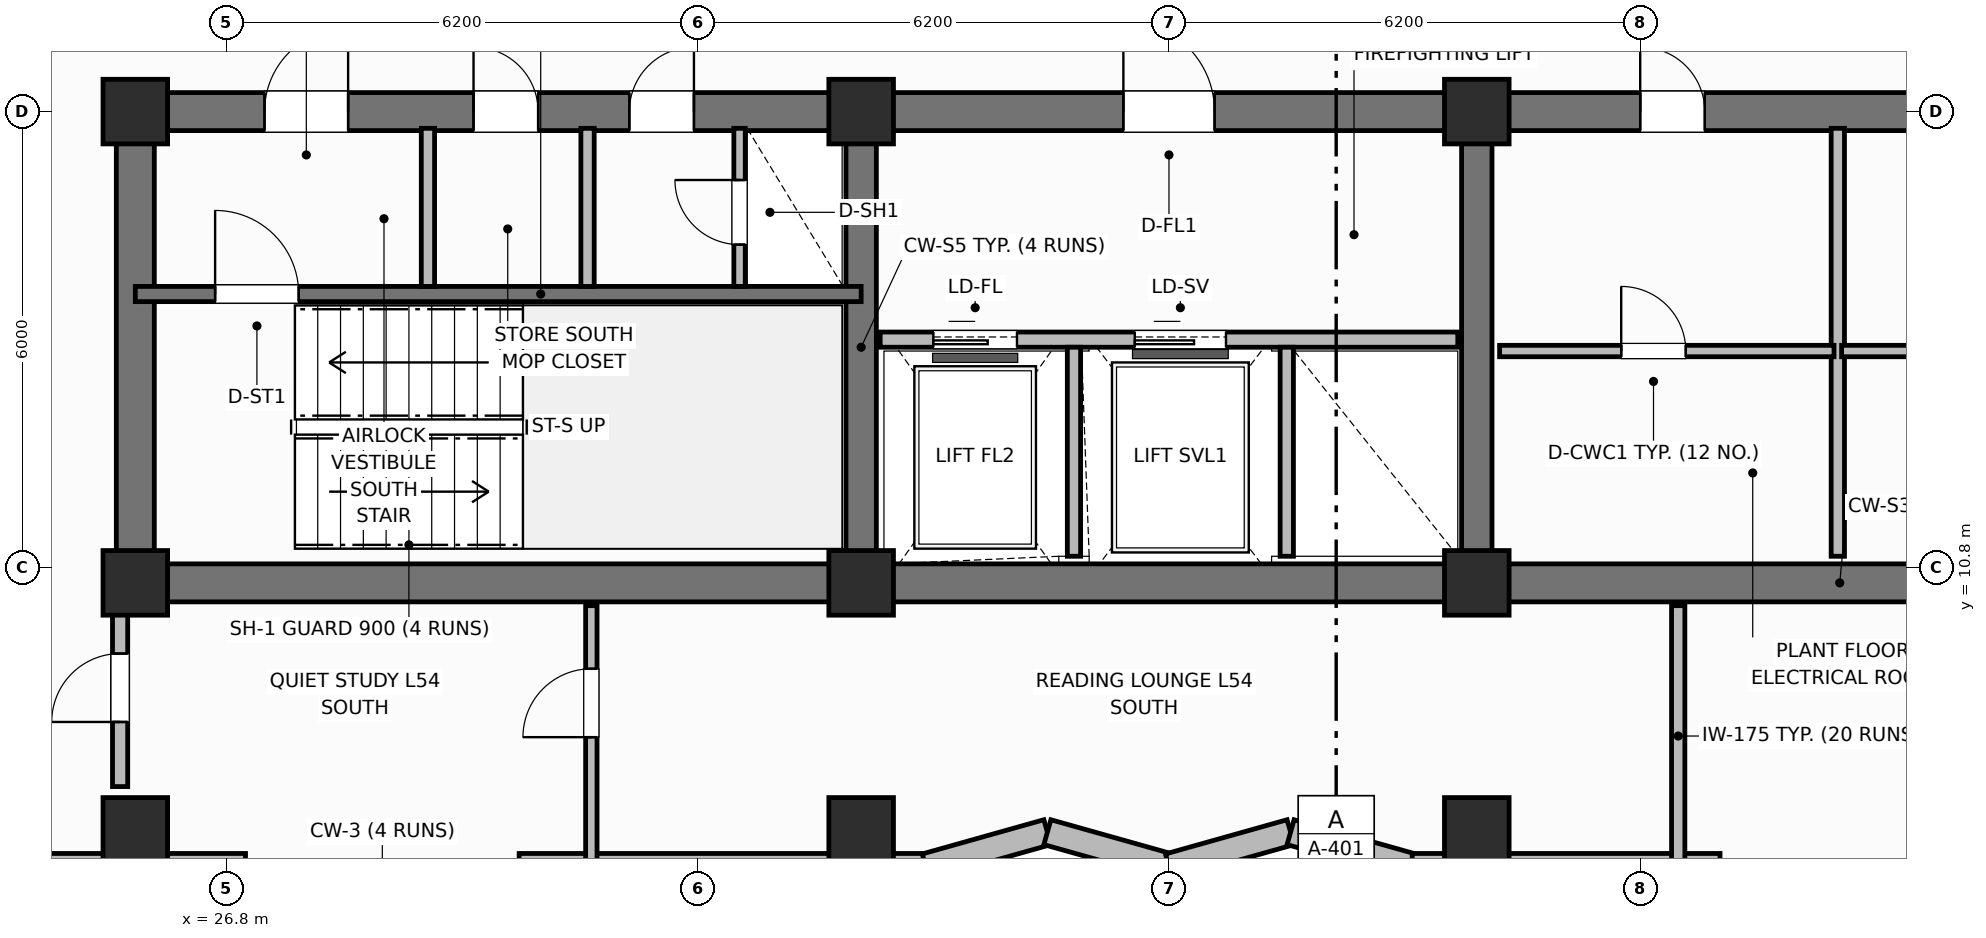
"""IFC4 building model, lengths in metres.
Left out: names, types, materials, properties, quantities, classifications, styles, units other than length and angle.
Written with IfcOpenShell. Run it as: python <this file> out.ifc"""

import sys

from ifc_helpers import new_model, si_unit, direction, frame, frame_2d, origin, origin_2d, place, context, subcontext, project, spatial, rectangle, extrude, element, fill, save


model = new_model("IFC4")
c1 = context("Model", 3, precision=1e-05, world=origin(), true_north=direction((0.0, 1.0)))
c2 = subcontext(c1, "Body", "Model", "MODEL_VIEW")
j1 = project(units=[si_unit("LENGTHUNIT", "METRE"), si_unit("PLANEANGLEUNIT", "RADIAN")], contexts=[c1])
p1 = place(None, origin())
s1 = spatial("IfcSite", under=j1, at=p1, CompositionType="ELEMENT")
p2 = place(p1, origin())
s2 = spatial("IfcBuilding", under=s1, at=p2, CompositionType="ELEMENT")
p3 = place(p2, frame((0.0, 0.0, 218.4)))
s3 = spatial("IfcBuildingStorey", under=s2, at=p3, CompositionType="ELEMENT", Elevation=218.4)
p4 = place(p3, frame((52.8, 10.6, 0.0), z_axis=(0.0, 0.0, 1.0), x_axis=(-1.0, 0.0, 0.0)))
e1 = element("IfcWall", 1, at=p4, inside=s3, PredefinedType="SHEAR", context=c2, shape_type="SweptSolid", body=[
    extrude(rectangle(XDim=27.2, YDim=0.5, at=frame_2d((13.6, 0.0))), origin(), (0.0, 0.0, 1.0), 3.7),
])
p5 = place(p3, frame((25.6, 10.85, 0.0), z_axis=(0.0, 0.0, 1.0), x_axis=(0.0, 1.0, 0.0)))
e2 = element("IfcWall", 2, at=p5, inside=s3, PredefinedType="SHEAR", context=c2, shape_type="SweptSolid", body=[
    extrude(rectangle(XDim=5.7, YDim=0.5, at=frame_2d((2.85, 0.0))), origin(), (0.0, 0.0, 1.0), 3.7),
])
p6 = place(p3, frame((25.6, 16.8, 0.0), z_axis=(0.0, 0.0, 1.0), x_axis=(1.0, 0.0, 0.0)))
e3 = element("IfcWall", 3, at=p6, inside=s3, PredefinedType="SHEAR", context=c2, shape_type="SweptSolid", body=[
    extrude(rectangle(XDim=27.2, YDim=0.5, at=frame_2d((13.6, 0.0))), origin(), (0.0, 0.0, 1.0), 3.7),
])
p7 = place(p6, frame((1.7, 0.0, 0.0)))
e4 = element("IfcOpeningElement", 4, at=p7, cuts=e3, PredefinedType="OPENING", context=c2, shape_type="SweptSolid", body=[
    extrude(rectangle(XDim=1.1, YDim=2.15, at=frame_2d((0.55, 1.075))), frame((0.0, 0.26, 0.0), z_axis=(0.0, -1.0, 0.0), x_axis=(1.0, 0.0, 0.0)), (0.0, 0.0, 1.0), 0.52),
])
p8 = place(p6, frame((4.45, 0.0, 0.0)))
e5 = element("IfcOpeningElement", 5, at=p8, cuts=e3, PredefinedType="OPENING", context=c2, shape_type="SweptSolid", body=[
    extrude(rectangle(XDim=0.85, YDim=2.1, at=frame_2d((0.425, 1.05))), frame((0.0, 0.26, 0.0), z_axis=(0.0, -1.0, 0.0), x_axis=(1.0, 0.0, 0.0)), (0.0, 0.0, 1.0), 0.52),
])
p9 = place(p6, frame((6.5, 0.0, 0.0)))
e6 = element("IfcOpeningElement", 6, at=p9, cuts=e3, PredefinedType="OPENING", context=c2, shape_type="SweptSolid", body=[
    extrude(rectangle(XDim=0.85, YDim=2.1, at=frame_2d((0.425, 1.05))), frame((0.0, 0.26, 0.0), z_axis=(0.0, -1.0, 0.0), x_axis=(1.0, 0.0, 0.0)), (0.0, 0.0, 1.0), 0.52),
])
p10 = place(p6, frame((13.0, 0.0, 0.0)))
e7 = element("IfcOpeningElement", 7, at=p10, cuts=e3, PredefinedType="OPENING", context=c2, shape_type="SweptSolid", body=[
    extrude(rectangle(XDim=1.2, YDim=2.15, at=frame_2d((0.6, 1.075))), frame((0.0, 0.26, 0.0), z_axis=(0.0, -1.0, 0.0), x_axis=(1.0, 0.0, 0.0)), (0.0, 0.0, 1.0), 0.52),
])
p11 = place(p6, frame((19.8, 0.0, 0.0)))
e8 = element("IfcOpeningElement", 8, at=p11, cuts=e3, PredefinedType="OPENING", context=c2, shape_type="SweptSolid", body=[
    extrude(rectangle(XDim=0.85, YDim=2.1, at=frame_2d((0.425, 1.05))), frame((0.0, 0.26, 0.0), z_axis=(0.0, -1.0, 0.0), x_axis=(1.0, 0.0, 0.0)), (0.0, 0.0, 1.0), 0.52),
])
p12 = place(p6, frame((24.2, 0.0, 0.0)))
e9 = element("IfcOpeningElement", 9, at=p12, cuts=e3, PredefinedType="OPENING", context=c2, shape_type="SweptSolid", body=[
    extrude(rectangle(XDim=0.85, YDim=2.1, at=frame_2d((0.425, 1.05))), frame((0.0, 0.26, 0.0), z_axis=(0.0, -1.0, 0.0), x_axis=(1.0, 0.0, 0.0)), (0.0, 0.0, 1.0), 0.52),
])
for number, where, z_axis, x_axis in (
    (10, (35.15, 10.85, 0.0), (0.0, 0.0, 1.0), (0.0, 1.0, 0.0)),
    (11, (43.25, 10.85, 0.0), (0.0, 0.0, 1.0), (0.0, 1.0, 0.0)),
):
    element("IfcWall", number, at=place(p3, frame(where, z_axis=z_axis, x_axis=x_axis)), inside=s3, PredefinedType="SHEAR", context=c2, shape_type="SweptSolid", body=[
        extrude(rectangle(XDim=5.7, YDim=0.4, at=frame_2d((2.85, 0.0))), origin(), (0.0, 0.0, 1.0), 3.7),
    ])
for number, where, z_axis, x_axis in (
    (12, (25.6, 10.6, 0.0), (0.0, 0.0, 1.0), (1.0, 0.0, 0.0)),
    (13, (25.6, 16.8, 0.0), (0.0, 0.0, 1.0), (1.0, 0.0, 0.0)),
    (14, (35.15, 10.6, 0.0), (0.0, 0.0, 1.0), (1.0, 0.0, 0.0)),
    (15, (35.15, 16.8, 0.0), (0.0, 0.0, 1.0), (1.0, 0.0, 0.0)),
    (16, (43.25, 10.6, 0.0), (0.0, 0.0, 1.0), (1.0, 0.0, 0.0)),
    (17, (43.25, 16.8, 0.0), (0.0, 0.0, 1.0), (1.0, 0.0, 0.0)),
    (18, (25.6, 7.35, 0.0), (0.0, 0.0, 1.0), (1.0, 0.0, 0.0)),
    (19, (35.15, 7.35, 0.0), (0.0, 0.0, 1.0), (1.0, 0.0, 0.0)),
    (20, (43.25, 7.35, 0.0), (0.0, 0.0, 1.0), (1.0, 0.0, 0.0)),
):
    element("IfcColumn", number, at=place(p3, frame(where, z_axis=z_axis, x_axis=x_axis)), inside=s3, PredefinedType="COLUMN", context=c2, shape_type="SweptSolid", body=[
        extrude(rectangle(XDim=0.85, YDim=0.85, at=origin_2d()), origin(), (0.0, 0.0, 1.0), 3.7),
    ])
p13 = place(p3, frame((20.2, 6.87, 0.0), z_axis=(0.0, 0.0, 1.0), x_axis=(1.0, 0.0, 0.0)))
e21 = element("IfcWall", 21, at=p13, inside=s3, PredefinedType="SOLIDWALL", context=c2, shape_type="SweptSolid", body=[
    extrude(rectangle(XDim=6.85, YDim=0.34, at=frame_2d((3.425, 0.0))), origin(), (0.0, 0.0, 1.0), 2.72),
])
p14 = place(p3, frame((30.65, 6.87, 0.0), z_axis=(0.0, 0.0, 1.0), x_axis=(1.0, 0.0, 0.0)))
e22 = element("IfcWall", 22, at=p14, inside=s3, PredefinedType="SOLIDWALL", context=c2, shape_type="SweptSolid", body=[
    extrude(rectangle(XDim=5.35, YDim=0.34, at=frame_2d((2.675, 0.0))), origin(), (0.0, 0.0, 1.0), 2.72),
])
p15 = place(p3, frame((36.0, 6.87, 0.0), z_axis=(0.0, 0.0, 1.0), x_axis=(0.962662902433, 0.270703040766, 0.0)))
e23 = element("IfcWall", 23, at=p15, inside=s3, PredefinedType="SOLIDWALL", context=c2, shape_type="SweptSolid", body=[
    extrude(rectangle(XDim=1.662, YDim=0.34, at=frame_2d((0.831, 0.0))), origin(), (0.0, 0.0, 1.0), 2.72),
])
p16 = place(p3, frame((37.6, 7.32, 0.0), z_axis=(0.0, 0.0, 1.0), x_axis=(0.962652136636, -0.270741322725, 0.0)))
e24 = element("IfcWall", 24, at=p16, inside=s3, PredefinedType="SOLIDWALL", context=c2, shape_type="SweptSolid", body=[
    extrude(rectangle(XDim=1.662, YDim=0.34, at=frame_2d((0.831, 0.0))), origin(), (0.0, 0.0, 1.0), 2.72),
])
p17 = place(p3, frame((39.2, 6.87, 0.0), z_axis=(0.0, 0.0, 1.0), x_axis=(0.962662902433, 0.270703040766, 0.0)))
e25 = element("IfcWall", 25, at=p17, inside=s3, PredefinedType="SOLIDWALL", context=c2, shape_type="SweptSolid", body=[
    extrude(rectangle(XDim=1.662, YDim=0.34, at=frame_2d((0.831, 0.0))), origin(), (0.0, 0.0, 1.0), 2.72),
])
p18 = place(p3, frame((40.8, 7.32, 0.0), z_axis=(0.0, 0.0, 1.0), x_axis=(0.962652136636, -0.270741322725, 0.0)))
e26 = element("IfcWall", 26, at=p18, inside=s3, PredefinedType="SOLIDWALL", context=c2, shape_type="SweptSolid", body=[
    extrude(rectangle(XDim=1.662, YDim=0.34, at=frame_2d((0.831, 0.0))), origin(), (0.0, 0.0, 1.0), 2.72),
])
p19 = place(p3, frame((42.4, 6.87, 0.0), z_axis=(0.0, 0.0, 1.0), x_axis=(1.0, 0.0, 0.0)))
e27 = element("IfcWall", 27, at=p19, inside=s3, PredefinedType="SOLIDWALL", context=c2, shape_type="SweptSolid", body=[
    extrude(rectangle(XDim=4.05, YDim=0.34, at=frame_2d((2.025, 0.0))), origin(), (0.0, 0.0, 1.0), 2.72),
])
p20 = place(p3, frame((25.6, 14.4, 0.0), z_axis=(0.0, 0.0, 1.0), x_axis=(1.0, 0.0, 0.0)))
e28 = element("IfcWall", 28, at=p20, inside=s3, PredefinedType="SHEAR", context=c2, shape_type="SweptSolid", body=[
    extrude(rectangle(XDim=9.55, YDim=0.2, at=frame_2d((4.775, 0.0))), origin(), (0.0, 0.0, 1.0), 3.7),
])
p21 = place(p20, frame((1.05, 0.0, 0.0)))
e29 = element("IfcOpeningElement", 29, at=p21, cuts=e28, PredefinedType="OPENING", context=c2, shape_type="SweptSolid", body=[
    extrude(rectangle(XDim=1.1, YDim=2.15, at=frame_2d((0.55, 1.075))), frame((0.0, 0.11, 0.0), z_axis=(0.0, -1.0, 0.0), x_axis=(1.0, 0.0, 0.0)), (0.0, 0.0, 1.0), 0.22),
])
for number, where, z_axis, x_axis in (
    (30, (29.45, 14.5, 0.0), (0.0, 0.0, 1.0), (0.0, 1.0, 0.0)),
    (31, (31.55, 14.5, 0.0), (0.0, 0.0, 1.0), (0.0, 1.0, 0.0)),
):
    element("IfcWall", number, at=place(p3, frame(where, z_axis=z_axis, x_axis=x_axis)), inside=s3, PredefinedType="PARTITIONING", context=c2, shape_type="SweptSolid", body=[
        extrude(rectangle(XDim=2.08, YDim=0.175, at=frame_2d((1.04, 0.0))), origin(), (0.0, 0.0, 1.0), 2.55),
    ])
p22 = place(p3, frame((33.55, 14.5, 0.0), z_axis=(0.0, 0.0, 1.0), x_axis=(0.0, 1.0, 0.0)))
e32 = element("IfcWall", 32, at=p22, inside=s3, PredefinedType="PARTITIONING", context=c2, shape_type="SweptSolid", body=[
    extrude(rectangle(XDim=2.08, YDim=0.15, at=frame_2d((1.04, 0.0))), origin(), (0.0, 0.0, 1.0), 2.55),
])
p23 = place(p22, frame((0.55, 0.0, 0.0)))
e33 = element("IfcOpeningElement", 33, at=p23, cuts=e32, PredefinedType="OPENING", context=c2, shape_type="SweptSolid", body=[
    extrude(rectangle(XDim=0.85, YDim=2.05, at=frame_2d((0.425, 1.025))), frame((0.0, 0.085, 0.0), z_axis=(0.0, -1.0, 0.0), x_axis=(1.0, 0.0, 0.0)), (0.0, 0.0, 1.0), 0.17),
])
p24 = place(p3, frame((35.4, 13.8, 0.0), z_axis=(0.0, 0.0, 1.0), x_axis=(1.0, 0.0, 0.0)))
e34 = element("IfcWall", 34, at=p24, inside=s3, PredefinedType="PARTITIONING", context=c2, shape_type="SweptSolid", body=[
    extrude(rectangle(XDim=7.6, YDim=0.2, at=frame_2d((3.8, 0.0))), origin(), (0.0, 0.0, 1.0), 2.32),
])
p25 = place(p24, frame((0.7, 0.0, 0.0)))
e35 = element("IfcOpeningElement", 35, at=p25, cuts=e34, PredefinedType="OPENING", context=c2, shape_type="SweptSolid", body=[
    extrude(rectangle(XDim=1.1, YDim=2.15, at=frame_2d((0.55, 1.075))), frame((0.0, 0.11, 0.0), z_axis=(0.0, -1.0, 0.0), x_axis=(1.0, 0.0, 0.0)), (0.0, 0.0, 1.0), 0.22),
])
p26 = place(p24, frame((3.35, 0.0, 0.0)))
e36 = element("IfcOpeningElement", 36, at=p26, cuts=e34, PredefinedType="OPENING", context=c2, shape_type="SweptSolid", body=[
    extrude(rectangle(XDim=1.2, YDim=2.15, at=frame_2d((0.6, 1.075))), frame((0.0, 0.11, 0.0), z_axis=(0.0, -1.0, 0.0), x_axis=(1.0, 0.0, 0.0)), (0.0, 0.0, 1.0), 0.22),
])
for number, where, z_axis, x_axis in (
    (37, (37.95, 10.95, 0.0), (0.0, 0.0, 1.0), (0.0, 1.0, 0.0)),
    (38, (40.75, 10.95, 0.0), (0.0, 0.0, 1.0), (0.0, 1.0, 0.0)),
):
    element("IfcWall", number, at=place(p3, frame(where, z_axis=z_axis, x_axis=x_axis)), inside=s3, PredefinedType="PARTITIONING", context=c2, shape_type="SweptSolid", body=[
        extrude(rectangle(XDim=2.75, YDim=0.175, at=frame_2d((1.375, 0.0))), origin(), (0.0, 0.0, 1.0), 2.55),
    ])
p27 = place(p3, frame((48.0, 10.95, 0.0), z_axis=(0.0, 0.0, 1.0), x_axis=(0.0, 1.0, 0.0)))
e39 = element("IfcWall", 39, at=p27, inside=s3, PredefinedType="PARTITIONING", context=c2, shape_type="SweptSolid", body=[
    extrude(rectangle(XDim=5.63, YDim=0.175, at=frame_2d((2.815, 0.0))), origin(), (0.0, 0.0, 1.0), 2.55),
])
p28 = place(p3, frame((43.55, 13.65, 0.0), z_axis=(0.0, 0.0, 1.0), x_axis=(1.0, 0.0, 0.0)))
e40 = element("IfcWall", 40, at=p28, inside=s3, PredefinedType="PARTITIONING", context=c2, shape_type="SweptSolid", body=[
    extrude(rectangle(XDim=4.4, YDim=0.15, at=frame_2d((2.2, 0.0))), origin(), (0.0, 0.0, 1.0), 2.55),
])
p29 = place(p28, frame((1.6, 0.0, 0.0)))
e41 = element("IfcOpeningElement", 41, at=p29, cuts=e40, PredefinedType="OPENING", context=c2, shape_type="SweptSolid", body=[
    extrude(rectangle(XDim=0.85, YDim=2.1, at=frame_2d((0.425, 1.05))), frame((0.0, 0.085, 0.0), z_axis=(0.0, -1.0, 0.0), x_axis=(1.0, 0.0, 0.0)), (0.0, 0.0, 1.0), 0.17),
])
p30 = place(p3, frame((48.05, 13.65, 0.0), z_axis=(0.0, 0.0, 1.0), x_axis=(1.0, 0.0, 0.0)))
e42 = element("IfcWall", 42, at=p30, inside=s3, PredefinedType="PARTITIONING", context=c2, shape_type="SweptSolid", body=[
    extrude(rectangle(XDim=4.4, YDim=0.15, at=frame_2d((2.2, 0.0))), origin(), (0.0, 0.0, 1.0), 2.55),
])
p31 = place(p30, frame((1.6, 0.0, 0.0)))
e43 = element("IfcOpeningElement", 43, at=p31, cuts=e42, PredefinedType="OPENING", context=c2, shape_type="SweptSolid", body=[
    extrude(rectangle(XDim=0.85, YDim=2.1, at=frame_2d((0.425, 1.05))), frame((0.0, 0.085, 0.0), z_axis=(0.0, -1.0, 0.0), x_axis=(1.0, 0.0, 0.0)), (0.0, 0.0, 1.0), 0.17),
])
p32 = place(p3, frame((31.6, 6.87, 0.0), z_axis=(0.0, 0.0, 1.0), x_axis=(0.0, 1.0, 0.0)))
e44 = element("IfcWall", 44, at=p32, inside=s3, PredefinedType="PARTITIONING", context=c2, shape_type="SweptSolid", body=[
    extrude(rectangle(XDim=3.43, YDim=0.15, at=frame_2d((1.715, 0.0))), origin(), (0.0, 0.0, 1.0), 2.55),
])
p33 = place(p32, frame((1.7, 0.0, 0.0)))
e45 = element("IfcOpeningElement", 45, at=p33, cuts=e44, PredefinedType="OPENING", context=c2, shape_type="SweptSolid", body=[
    extrude(rectangle(XDim=0.9, YDim=2.1, at=frame_2d((0.45, 1.05))), frame((0.0, 0.085, 0.0), z_axis=(0.0, -1.0, 0.0), x_axis=(1.0, 0.0, 0.0)), (0.0, 0.0, 1.0), 0.17),
])
p34 = place(p3, frame((45.9, 6.87, 0.0), z_axis=(0.0, 0.0, 1.0), x_axis=(0.0, 1.0, 0.0)))
e46 = element("IfcWall", 46, at=p34, inside=s3, PredefinedType="PARTITIONING", context=c2, shape_type="SweptSolid", body=[
    extrude(rectangle(XDim=3.43, YDim=0.175, at=frame_2d((1.715, 0.0))), origin(), (0.0, 0.0, 1.0), 2.55),
])
p35 = place(p3, frame((25.4, 7.92, 0.0), z_axis=(0.0, 0.0, 1.0), x_axis=(0.0, 1.0, 0.0)))
e47 = element("IfcWall", 47, at=p35, inside=s3, PredefinedType="PARTITIONING", context=c2, shape_type="SweptSolid", body=[
    extrude(rectangle(XDim=2.38, YDim=0.2, at=frame_2d((1.19, 0.0))), origin(), (0.0, 0.0, 1.0), 2.55),
])
p36 = place(p35, frame((0.85, 0.0, 0.0)))
e48 = element("IfcOpeningElement", 48, at=p36, cuts=e47, PredefinedType="OPENING", context=c2, shape_type="SweptSolid", body=[
    extrude(rectangle(XDim=0.9, YDim=2.1, at=frame_2d((0.45, 1.05))), frame((0.0, 0.11, 0.0), z_axis=(0.0, -1.0, 0.0), x_axis=(1.0, 0.0, 0.0)), (0.0, 0.0, 1.0), 0.22),
])
p37 = place(p21, origin())
e49 = element("IfcDoor", 49, at=p37, inside=s3, OperationType="SINGLE_SWING_LEFT", PredefinedType="DOOR", context=c2, shape_type="SweptSolid", body=[
    extrude(rectangle(XDim=1.1, YDim=2.15, at=frame_2d((0.55, 1.075))), frame((0.0, 0.025, 0.0), z_axis=(0.0, -1.0, 0.0), x_axis=(1.0, 0.0, 0.0)), (0.0, 0.0, 1.0), 0.05),
])
fill(e29, e49)
p38 = place(p23, origin())
e50 = element("IfcDoor", 50, at=p38, inside=s3, OperationType="SINGLE_SWING_RIGHT", PredefinedType="TRAPDOOR", context=c2, shape_type="SweptSolid", body=[
    extrude(rectangle(XDim=0.85, YDim=2.05, at=frame_2d((0.425, 1.025))), frame((0.0, 0.025, 0.0), z_axis=(0.0, -1.0, 0.0), x_axis=(1.0, 0.0, 0.0)), (0.0, 0.0, 1.0), 0.05),
])
fill(e33, e50)
p39 = place(p25, origin())
e51 = element("IfcDoor", 51, at=p39, inside=s3, OperationType="SLIDING_TO_LEFT", PredefinedType="DOOR", context=c2, shape_type="SweptSolid", body=[
    extrude(rectangle(XDim=1.1, YDim=2.15, at=frame_2d((0.55, 1.075))), frame((0.0, 0.025, 0.0), z_axis=(0.0, -1.0, 0.0), x_axis=(1.0, 0.0, 0.0)), (0.0, 0.0, 1.0), 0.05),
])
fill(e35, e51)
p40 = place(p26, origin())
e52 = element("IfcDoor", 52, at=p40, inside=s3, OperationType="SLIDING_TO_LEFT", PredefinedType="DOOR", context=c2, shape_type="SweptSolid", body=[
    extrude(rectangle(XDim=1.2, YDim=2.15, at=frame_2d((0.6, 1.075))), frame((0.0, 0.025, 0.0), z_axis=(0.0, -1.0, 0.0), x_axis=(1.0, 0.0, 0.0)), (0.0, 0.0, 1.0), 0.05),
])
fill(e36, e52)
p41 = place(p29, origin())
e53 = element("IfcDoor", 53, at=p41, inside=s3, OperationType="SINGLE_SWING_LEFT", PredefinedType="DOOR", context=c2, shape_type="SweptSolid", body=[
    extrude(rectangle(XDim=0.85, YDim=2.1, at=frame_2d((0.425, 1.05))), frame((0.0, 0.025, 0.0), z_axis=(0.0, -1.0, 0.0), x_axis=(1.0, 0.0, 0.0)), (0.0, 0.0, 1.0), 0.05),
])
fill(e41, e53)
p42 = place(p33, origin())
e54 = element("IfcDoor", 54, at=p42, inside=s3, OperationType="SINGLE_SWING_LEFT", PredefinedType="DOOR", context=c2, shape_type="SweptSolid", body=[
    extrude(rectangle(XDim=0.9, YDim=2.1, at=frame_2d((0.45, 1.05))), frame((0.0, 0.025, 0.0), z_axis=(0.0, -1.0, 0.0), x_axis=(1.0, 0.0, 0.0)), (0.0, 0.0, 1.0), 0.05),
])
fill(e45, e54)
p43 = place(p36, origin())
e55 = element("IfcDoor", 55, at=p43, inside=s3, OperationType="SINGLE_SWING_LEFT", PredefinedType="DOOR", context=c2, shape_type="SweptSolid", body=[
    extrude(rectangle(XDim=0.9, YDim=2.1, at=frame_2d((0.45, 1.05))), frame((0.0, 0.025, 0.0), z_axis=(0.0, -1.0, 0.0), x_axis=(1.0, 0.0, 0.0)), (0.0, 0.0, 1.0), 0.05),
])
fill(e48, e55)
p44 = place(p7, origin())
e56 = element("IfcDoor", 56, at=p44, inside=s3, OperationType="SINGLE_SWING_RIGHT", PredefinedType="DOOR", context=c2, shape_type="SweptSolid", body=[
    extrude(rectangle(XDim=1.1, YDim=2.15, at=frame_2d((0.55, 1.075))), frame((0.0, 0.025, 0.0), z_axis=(0.0, -1.0, 0.0), x_axis=(1.0, 0.0, 0.0)), (0.0, 0.0, 1.0), 0.05),
])
fill(e4, e56)
p45 = place(p8, origin())
e57 = element("IfcDoor", 57, at=p45, inside=s3, OperationType="SINGLE_SWING_LEFT", PredefinedType="DOOR", context=c2, shape_type="SweptSolid", body=[
    extrude(rectangle(XDim=0.85, YDim=2.1, at=frame_2d((0.425, 1.05))), frame((0.0, 0.025, 0.0), z_axis=(0.0, -1.0, 0.0), x_axis=(1.0, 0.0, 0.0)), (0.0, 0.0, 1.0), 0.05),
])
fill(e5, e57)
p46 = place(p9, origin())
e58 = element("IfcDoor", 58, at=p46, inside=s3, OperationType="SINGLE_SWING_RIGHT", PredefinedType="DOOR", context=c2, shape_type="SweptSolid", body=[
    extrude(rectangle(XDim=0.85, YDim=2.1, at=frame_2d((0.425, 1.05))), frame((0.0, 0.025, 0.0), z_axis=(0.0, -1.0, 0.0), x_axis=(1.0, 0.0, 0.0)), (0.0, 0.0, 1.0), 0.05),
])
fill(e6, e58)
p47 = place(p10, origin())
e59 = element("IfcDoor", 59, at=p47, inside=s3, OperationType="SINGLE_SWING_LEFT", PredefinedType="DOOR", context=c2, shape_type="SweptSolid", body=[
    extrude(rectangle(XDim=1.2, YDim=2.15, at=frame_2d((0.6, 1.075))), frame((0.0, 0.025, 0.0), z_axis=(0.0, -1.0, 0.0), x_axis=(1.0, 0.0, 0.0)), (0.0, 0.0, 1.0), 0.05),
])
fill(e7, e59)
p48 = place(p11, origin())
e60 = element("IfcDoor", 60, at=p48, inside=s3, OperationType="SINGLE_SWING_LEFT", PredefinedType="DOOR", context=c2, shape_type="SweptSolid", body=[
    extrude(rectangle(XDim=0.85, YDim=2.1, at=frame_2d((0.425, 1.05))), frame((0.0, 0.025, 0.0), z_axis=(0.0, -1.0, 0.0), x_axis=(1.0, 0.0, 0.0)), (0.0, 0.0, 1.0), 0.05),
])
fill(e8, e60)
save(model, sys.argv[1])
